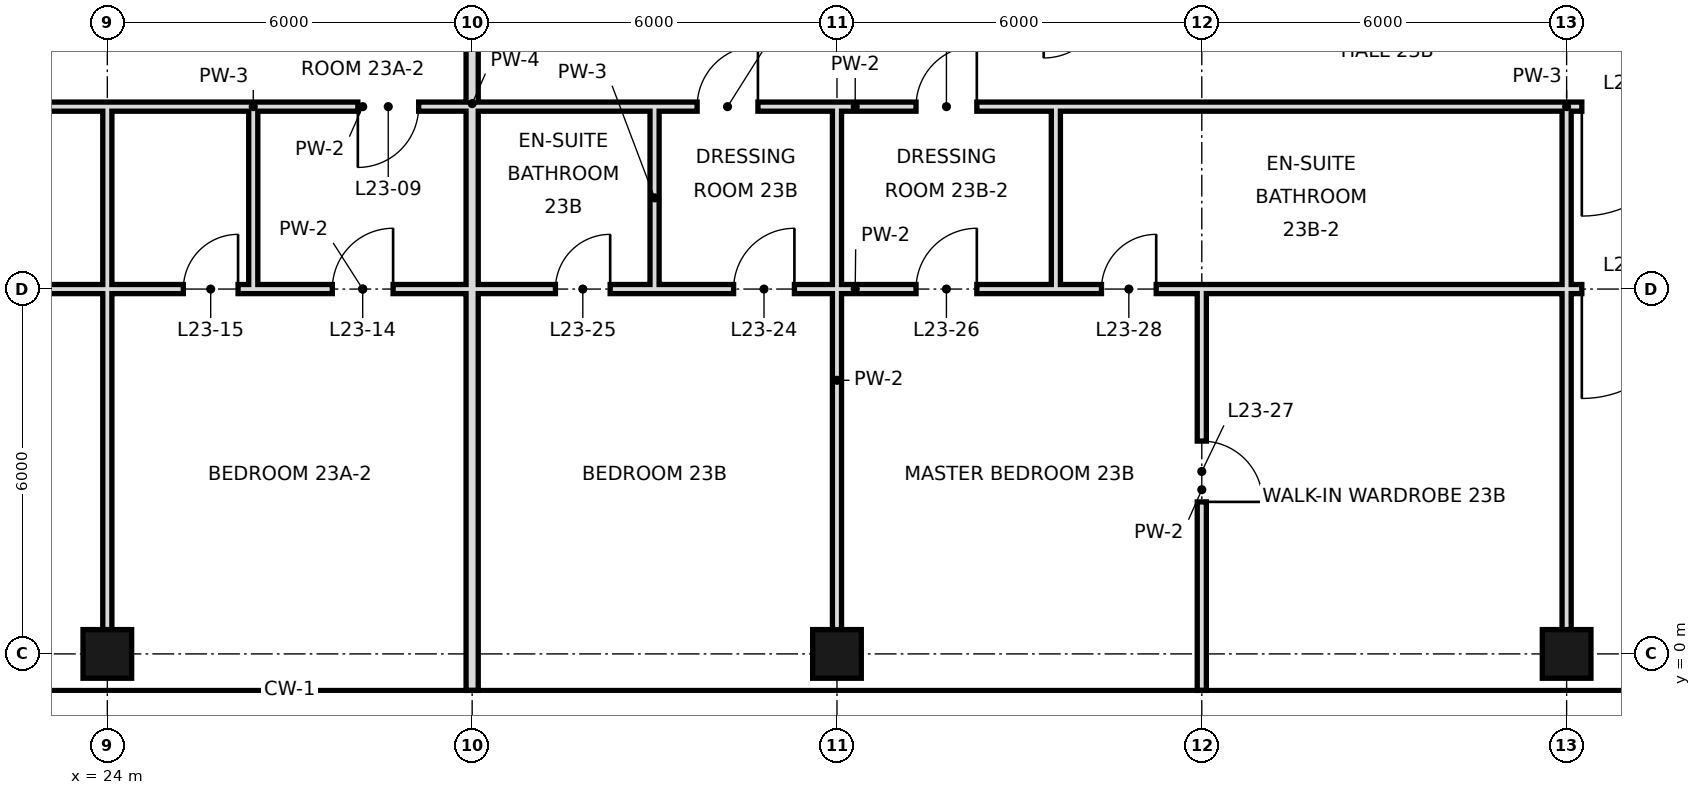
"""IFC4 building model, lengths in metres.
Left out: names, types, materials, properties, quantities, classifications, styles, units other than length and angle.
Written with IfcOpenShell. Run it as: python <this file> out.ifc"""

import sys

from ifc_helpers import new_model, si_unit, direction, frame, frame_2d, origin, origin_2d, place, context, subcontext, project, spatial, rectangle, hollow_rectangle, extrude, element, fill, save


model = new_model("IFC4")
c1 = context("Model", 3, precision=1e-05, world=origin(), true_north=direction((0.0, 1.0)))
c2 = subcontext(c1, "Body", "Model", "MODEL_VIEW")
j1 = project(units=[si_unit("LENGTHUNIT", "METRE"), si_unit("PLANEANGLEUNIT", "RADIAN")], contexts=[c1])
p1 = place(None, origin())
s1 = spatial("IfcSite", under=j1, at=p1, CompositionType="ELEMENT")
p2 = place(p1, origin())
s2 = spatial("IfcBuilding", under=s1, at=p2, CompositionType="ELEMENT")
p3 = place(p2, frame((0.0, 0.0, 107.0)))
s3 = spatial("IfcBuildingStorey", under=s2, at=p3, CompositionType="ELEMENT", Elevation=107.0)
for number, where, z_axis, x_axis in (
    (1, (24.0, 0.0, 0.0), (0.0, 0.0, 1.0), (1.0, 0.0, 0.0)),
    (2, (36.0, 0.0, 0.0), (0.0, 0.0, 1.0), (1.0, 0.0, 0.0)),
    (3, (48.0, 0.0, 0.0), (0.0, 0.0, 1.0), (1.0, 0.0, 0.0)),
):
    element("IfcColumn", number, at=place(p3, frame(where, z_axis=z_axis, x_axis=x_axis)), inside=s3, PredefinedType="COLUMN", context=c2, shape_type="SweptSolid", body=[
        extrude(hollow_rectangle(XDim=0.8, YDim=0.8, WallThickness=0.04, at=origin_2d()), origin(), (0.0, 0.0, 1.0), 3.6),
    ])
p4 = place(p3, frame((24.0, 0.0, 0.0), z_axis=(0.0, 0.0, 1.0), x_axis=(0.0, 1.0, 0.0)))
e4 = element("IfcWall", 4, at=p4, inside=s3, PredefinedType="PARTITIONING", context=c2, shape_type="SweptSolid", body=[
    extrude(rectangle(XDim=6.0, YDim=0.15, at=frame_2d((3.0, 0.0))), origin(), (0.0, 0.0, 1.0), 2.72),
])
p5 = place(p3, frame((24.0, 6.0, 0.0), z_axis=(0.0, 0.0, 1.0), x_axis=(0.0, 1.0, 0.0)))
e5 = element("IfcWall", 5, at=p5, inside=s3, PredefinedType="PARTITIONING", context=c2, shape_type="SweptSolid", body=[
    extrude(rectangle(XDim=3.0, YDim=0.15, at=frame_2d((1.5, 0.0))), origin(), (0.0, 0.0, 1.0), 2.72),
])
p6 = place(p3, frame((26.4, 6.0, 0.0), z_axis=(0.0, 0.0, 1.0), x_axis=(0.0, 1.0, 0.0)))
e6 = element("IfcWall", 6, at=p6, inside=s3, PredefinedType="PARTITIONING", context=c2, shape_type="SweptSolid", body=[
    extrude(rectangle(XDim=3.0, YDim=0.15, at=frame_2d((1.5, 0.0))), origin(), (0.0, 0.0, 1.0), 3.42),
])
p7 = place(p3, frame((30.0, -0.6, 0.0), z_axis=(0.0, 0.0, 1.0), x_axis=(0.0, 1.0, 0.0)))
e7 = element("IfcWall", 7, at=p7, inside=s3, PredefinedType="SOLIDWALL", context=c2, shape_type="SweptSolid", body=[
    extrude(rectangle(XDim=19.3, YDim=0.2, at=frame_2d((9.65, 0.0))), origin(), (0.0, 0.0, 1.0), 2.72),
])
p8 = place(p3, frame((33.0, 6.0, 0.0), z_axis=(0.0, 0.0, 1.0), x_axis=(0.0, 1.0, 0.0)))
e8 = element("IfcWall", 8, at=p8, inside=s3, PredefinedType="PARTITIONING", context=c2, shape_type="SweptSolid", body=[
    extrude(rectangle(XDim=3.0, YDim=0.15, at=frame_2d((1.5, 0.0))), origin(), (0.0, 0.0, 1.0), 3.42),
])
p9 = place(p3, frame((36.0, 0.0, 0.0), z_axis=(0.0, 0.0, 1.0), x_axis=(0.0, 1.0, 0.0)))
e9 = element("IfcWall", 9, at=p9, inside=s3, PredefinedType="PARTITIONING", context=c2, shape_type="SweptSolid", body=[
    extrude(rectangle(XDim=9.0, YDim=0.15, at=frame_2d((4.5, 0.0))), origin(), (0.0, 0.0, 1.0), 2.72),
])
p10 = place(p3, frame((39.6, 6.0, 0.0), z_axis=(0.0, 0.0, 1.0), x_axis=(0.0, 1.0, 0.0)))
e10 = element("IfcWall", 10, at=p10, inside=s3, PredefinedType="PARTITIONING", context=c2, shape_type="SweptSolid", body=[
    extrude(rectangle(XDim=3.0, YDim=0.15, at=frame_2d((1.5, 0.0))), origin(), (0.0, 0.0, 1.0), 3.42),
])
p11 = place(p3, frame((42.0, -0.6, 0.0), z_axis=(0.0, 0.0, 1.0), x_axis=(0.0, 1.0, 0.0)))
e11 = element("IfcWall", 11, at=p11, inside=s3, PredefinedType="PARTITIONING", context=c2, shape_type="SweptSolid", body=[
    extrude(rectangle(XDim=6.6, YDim=0.15, at=frame_2d((3.3, 0.0))), origin(), (0.0, 0.0, 1.0), 2.72),
])
p12 = place(p11, frame((3.1, 0.0, 0.0)))
e12 = element("IfcOpeningElement", 12, at=p12, cuts=e11, PredefinedType="OPENING", context=c2, shape_type="SweptSolid", body=[
    extrude(rectangle(XDim=1.0, YDim=2.4, at=frame_2d((0.5, 1.2))), frame((0.0, 0.085, 0.0), z_axis=(0.0, -1.0, 0.0), x_axis=(1.0, 0.0, 0.0)), (0.0, 0.0, 1.0), 0.17),
])
p13 = place(p3, frame((48.0, 0.0, 0.0), z_axis=(0.0, 0.0, 1.0), x_axis=(0.0, 1.0, 0.0)))
e13 = element("IfcWall", 13, at=p13, inside=s3, PredefinedType="PARTITIONING", context=c2, shape_type="SweptSolid", body=[
    extrude(rectangle(XDim=6.0, YDim=0.15, at=frame_2d((3.0, 0.0))), origin(), (0.0, 0.0, 1.0), 2.72),
])
p14 = place(p3, frame((48.0, 6.0, 0.0), z_axis=(0.0, 0.0, 1.0), x_axis=(0.0, 1.0, 0.0)))
e14 = element("IfcWall", 14, at=p14, inside=s3, PredefinedType="PARTITIONING", context=c2, shape_type="SweptSolid", body=[
    extrude(rectangle(XDim=3.0, YDim=0.15, at=frame_2d((1.5, 0.0))), origin(), (0.0, 0.0, 1.0), 2.72),
])
p15 = place(p3, frame((9.0, 6.0, 0.0), z_axis=(0.0, 0.0, 1.0), x_axis=(1.0, 0.0, 0.0)))
e15 = element("IfcWall", 15, at=p15, inside=s3, PredefinedType="PARTITIONING", context=c2, shape_type="SweptSolid", body=[
    extrude(rectangle(XDim=15.0, YDim=0.15, at=frame_2d((7.5, 0.0))), origin(), (0.0, 0.0, 1.0), 2.97),
])
p16 = place(p15, frame((1.3, 0.0, 0.0)))
e16 = element("IfcOpeningElement", 16, at=p16, cuts=e15, PredefinedType="OPENING", context=c2, shape_type="SweptSolid", body=[
    extrude(rectangle(XDim=1.0, YDim=2.4, at=frame_2d((0.5, 1.2))), frame((0.0, 0.085, 0.0), z_axis=(0.0, -1.0, 0.0), x_axis=(1.0, 0.0, 0.0)), (0.0, 0.0, 1.0), 0.17),
])
p17 = place(p15, frame((3.25, 0.0, 0.0)))
e17 = element("IfcOpeningElement", 17, at=p17, cuts=e15, PredefinedType="OPENING", context=c2, shape_type="SweptSolid", body=[
    extrude(rectangle(XDim=1.0, YDim=2.4, at=frame_2d((0.5, 1.2))), frame((0.0, 0.085, 0.0), z_axis=(0.0, -1.0, 0.0), x_axis=(1.0, 0.0, 0.0)), (0.0, 0.0, 1.0), 0.17),
])
p18 = place(p3, frame((26.4, 6.0, 0.0), z_axis=(0.0, 0.0, 1.0), x_axis=(1.0, 0.0, 0.0)))
e18 = element("IfcWall", 18, at=p18, inside=s3, PredefinedType="PARTITIONING", context=c2, shape_type="SweptSolid", body=[
    extrude(rectangle(XDim=3.6, YDim=0.15, at=frame_2d((1.8, 0.0))), origin(), (0.0, 0.0, 1.0), 2.97),
])
p19 = place(p18, frame((1.3, 0.0, 0.0)))
e19 = element("IfcOpeningElement", 19, at=p19, cuts=e18, PredefinedType="OPENING", context=c2, shape_type="SweptSolid", body=[
    extrude(rectangle(XDim=1.0, YDim=2.4, at=frame_2d((0.5, 1.2))), frame((0.0, 0.085, 0.0), z_axis=(0.0, -1.0, 0.0), x_axis=(1.0, 0.0, 0.0)), (0.0, 0.0, 1.0), 0.17),
])
p20 = place(p3, frame((33.0, 6.0, 0.0), z_axis=(0.0, 0.0, 1.0), x_axis=(1.0, 0.0, 0.0)))
e20 = element("IfcWall", 20, at=p20, inside=s3, PredefinedType="PARTITIONING", context=c2, shape_type="SweptSolid", body=[
    extrude(rectangle(XDim=6.6, YDim=0.15, at=frame_2d((3.3, 0.0))), origin(), (0.0, 0.0, 1.0), 2.97),
])
p21 = place(p20, frame((1.3, 0.0, 0.0)))
e21 = element("IfcOpeningElement", 21, at=p21, cuts=e20, PredefinedType="OPENING", context=c2, shape_type="SweptSolid", body=[
    extrude(rectangle(XDim=1.0, YDim=2.4, at=frame_2d((0.5, 1.2))), frame((0.0, 0.085, 0.0), z_axis=(0.0, -1.0, 0.0), x_axis=(1.0, 0.0, 0.0)), (0.0, 0.0, 1.0), 0.17),
])
p22 = place(p20, frame((4.3, 0.0, 0.0)))
e22 = element("IfcOpeningElement", 22, at=p22, cuts=e20, PredefinedType="OPENING", context=c2, shape_type="SweptSolid", body=[
    extrude(rectangle(XDim=1.0, YDim=2.4, at=frame_2d((0.5, 1.2))), frame((0.0, 0.085, 0.0), z_axis=(0.0, -1.0, 0.0), x_axis=(1.0, 0.0, 0.0)), (0.0, 0.0, 1.0), 0.17),
])
p23 = place(p3, frame((48.0, 6.0, 0.0), z_axis=(0.0, 0.0, 1.0), x_axis=(1.0, 0.0, 0.0)))
e23 = element("IfcWall", 23, at=p23, inside=s3, PredefinedType="PARTITIONING", context=c2, shape_type="SweptSolid", body=[
    extrude(rectangle(XDim=12.0, YDim=0.15, at=frame_2d((6.0, 0.0))), origin(), (0.0, 0.0, 1.0), 2.72),
])
p24 = place(p23, frame((0.25, 0.0, 0.0)))
e24 = element("IfcOpeningElement", 24, at=p24, cuts=e23, PredefinedType="OPENING", context=c2, shape_type="SweptSolid", body=[
    extrude(rectangle(XDim=1.8, YDim=2.4, at=frame_2d((0.9, 1.2))), frame((0.0, 0.085, 0.0), z_axis=(0.0, -1.0, 0.0), x_axis=(1.0, 0.0, 0.0)), (0.0, 0.0, 1.0), 0.17),
])
p25 = place(p3, frame((24.0, 6.0, 0.0), z_axis=(0.0, 0.0, 1.0), x_axis=(1.0, 0.0, 0.0)))
e25 = element("IfcWall", 25, at=p25, inside=s3, PredefinedType="PARTITIONING", context=c2, shape_type="SweptSolid", body=[
    extrude(rectangle(XDim=2.4, YDim=0.15, at=frame_2d((1.2, 0.0))), origin(), (0.0, 0.0, 1.0), 2.97),
])
p26 = place(p25, frame((1.25, 0.0, 0.0)))
e26 = element("IfcOpeningElement", 26, at=p26, cuts=e25, PredefinedType="OPENING", context=c2, shape_type="SweptSolid", body=[
    extrude(rectangle(XDim=0.9, YDim=2.4, at=frame_2d((0.45, 1.2))), frame((0.0, 0.085, 0.0), z_axis=(0.0, -1.0, 0.0), x_axis=(1.0, 0.0, 0.0)), (0.0, 0.0, 1.0), 0.17),
])
p27 = place(p3, frame((30.0, 6.0, 0.0), z_axis=(0.0, 0.0, 1.0), x_axis=(1.0, 0.0, 0.0)))
e27 = element("IfcWall", 27, at=p27, inside=s3, PredefinedType="PARTITIONING", context=c2, shape_type="SweptSolid", body=[
    extrude(rectangle(XDim=3.0, YDim=0.15, at=frame_2d((1.5, 0.0))), origin(), (0.0, 0.0, 1.0), 2.97),
])
p28 = place(p27, frame((1.37, 0.0, 0.0)))
e28 = element("IfcOpeningElement", 28, at=p28, cuts=e27, PredefinedType="OPENING", context=c2, shape_type="SweptSolid", body=[
    extrude(rectangle(XDim=0.9, YDim=2.4, at=frame_2d((0.45, 1.2))), frame((0.0, 0.085, 0.0), z_axis=(0.0, -1.0, 0.0), x_axis=(1.0, 0.0, 0.0)), (0.0, 0.0, 1.0), 0.17),
])
p29 = place(p3, frame((39.6, 6.0, 0.0), z_axis=(0.0, 0.0, 1.0), x_axis=(1.0, 0.0, 0.0)))
e29 = element("IfcWall", 29, at=p29, inside=s3, PredefinedType="PARTITIONING", context=c2, shape_type="SweptSolid", body=[
    extrude(rectangle(XDim=8.4, YDim=0.15, at=frame_2d((4.2, 0.0))), origin(), (0.0, 0.0, 1.0), 2.97),
])
p30 = place(p29, frame((0.75, 0.0, 0.0)))
e30 = element("IfcOpeningElement", 30, at=p30, cuts=e29, PredefinedType="OPENING", context=c2, shape_type="SweptSolid", body=[
    extrude(rectangle(XDim=0.9, YDim=2.4, at=frame_2d((0.45, 1.2))), frame((0.0, 0.085, 0.0), z_axis=(0.0, -1.0, 0.0), x_axis=(1.0, 0.0, 0.0)), (0.0, 0.0, 1.0), 0.17),
])
p31 = place(p3, frame((9.0, 9.0, 0.0), z_axis=(0.0, 0.0, 1.0), x_axis=(1.0, 0.0, 0.0)))
e31 = element("IfcWall", 31, at=p31, inside=s3, PredefinedType="PARTITIONING", context=c2, shape_type="SweptSolid", body=[
    extrude(rectangle(XDim=15.0, YDim=0.15, at=frame_2d((7.5, 0.0))), origin(), (0.0, 0.0, 1.0), 3.42),
])
p32 = place(p31, frame((1.0, 0.0, 0.0)))
e32 = element("IfcOpeningElement", 32, at=p32, cuts=e31, PredefinedType="OPENING", context=c2, shape_type="SweptSolid", body=[
    extrude(rectangle(XDim=1.0, YDim=2.4, at=frame_2d((0.5, 1.2))), frame((0.0, 0.085, 0.0), z_axis=(0.0, -1.0, 0.0), x_axis=(1.0, 0.0, 0.0)), (0.0, 0.0, 1.0), 0.17),
])
p33 = place(p31, frame((10.6, 0.0, 0.0)))
e33 = element("IfcOpeningElement", 33, at=p33, cuts=e31, PredefinedType="OPENING", context=c2, shape_type="SweptSolid", body=[
    extrude(rectangle(XDim=1.0, YDim=2.4, at=frame_2d((0.5, 1.2))), frame((0.0, 0.085, 0.0), z_axis=(0.0, -1.0, 0.0), x_axis=(1.0, 0.0, 0.0)), (0.0, 0.0, 1.0), 0.17),
])
p34 = place(p3, frame((26.4, 9.0, 0.0), z_axis=(0.0, 0.0, 1.0), x_axis=(1.0, 0.0, 0.0)))
e34 = element("IfcWall", 34, at=p34, inside=s3, PredefinedType="PARTITIONING", context=c2, shape_type="SweptSolid", body=[
    extrude(rectangle(XDim=3.6, YDim=0.15, at=frame_2d((1.8, 0.0))), origin(), (0.0, 0.0, 1.0), 3.42),
])
p35 = place(p34, frame((1.72, 0.0, 0.0)))
e35 = element("IfcOpeningElement", 35, at=p35, cuts=e34, PredefinedType="OPENING", context=c2, shape_type="SweptSolid", body=[
    extrude(rectangle(XDim=1.0, YDim=2.4, at=frame_2d((0.5, 1.2))), frame((0.0, 0.085, 0.0), z_axis=(0.0, -1.0, 0.0), x_axis=(1.0, 0.0, 0.0)), (0.0, 0.0, 1.0), 0.17),
])
p36 = place(p3, frame((33.0, 9.0, 0.0), z_axis=(0.0, 0.0, 1.0), x_axis=(1.0, 0.0, 0.0)))
e36 = element("IfcWall", 36, at=p36, inside=s3, PredefinedType="PARTITIONING", context=c2, shape_type="SweptSolid", body=[
    extrude(rectangle(XDim=6.6, YDim=0.15, at=frame_2d((3.3, 0.0))), origin(), (0.0, 0.0, 1.0), 3.42),
])
p37 = place(p36, frame((0.7, 0.0, 0.0)))
e37 = element("IfcOpeningElement", 37, at=p37, cuts=e36, PredefinedType="OPENING", context=c2, shape_type="SweptSolid", body=[
    extrude(rectangle(XDim=1.0, YDim=2.4, at=frame_2d((0.5, 1.2))), frame((0.0, 0.085, 0.0), z_axis=(0.0, -1.0, 0.0), x_axis=(1.0, 0.0, 0.0)), (0.0, 0.0, 1.0), 0.17),
])
p38 = place(p36, frame((4.3, 0.0, 0.0)))
e38 = element("IfcOpeningElement", 38, at=p38, cuts=e36, PredefinedType="OPENING", context=c2, shape_type="SweptSolid", body=[
    extrude(rectangle(XDim=1.0, YDim=2.4, at=frame_2d((0.5, 1.2))), frame((0.0, 0.085, 0.0), z_axis=(0.0, -1.0, 0.0), x_axis=(1.0, 0.0, 0.0)), (0.0, 0.0, 1.0), 0.17),
])
p39 = place(p3, frame((48.0, 9.0, 0.0), z_axis=(0.0, 0.0, 1.0), x_axis=(1.0, 0.0, 0.0)))
e39 = element("IfcWall", 39, at=p39, inside=s3, PredefinedType="PARTITIONING", context=c2, shape_type="SweptSolid", body=[
    extrude(rectangle(XDim=12.6, YDim=0.15, at=frame_2d((6.3, 0.0))), origin(), (0.0, 0.0, 1.0), 3.42),
])
p40 = place(p39, frame((0.25, 0.0, 0.0)))
e40 = element("IfcOpeningElement", 40, at=p40, cuts=e39, PredefinedType="OPENING", context=c2, shape_type="SweptSolid", body=[
    extrude(rectangle(XDim=1.8, YDim=2.4, at=frame_2d((0.9, 1.2))), frame((0.0, 0.085, 0.0), z_axis=(0.0, -1.0, 0.0), x_axis=(1.0, 0.0, 0.0)), (0.0, 0.0, 1.0), 0.17),
])
p41 = place(p3, frame((24.0, 9.0, 0.0), z_axis=(0.0, 0.0, 1.0), x_axis=(1.0, 0.0, 0.0)))
e41 = element("IfcWall", 41, at=p41, inside=s3, PredefinedType="PARTITIONING", context=c2, shape_type="SweptSolid", body=[
    extrude(rectangle(XDim=2.4, YDim=0.15, at=frame_2d((1.2, 0.0))), origin(), (0.0, 0.0, 1.0), 3.42),
])
p42 = place(p3, frame((30.0, 9.0, 0.0), z_axis=(0.0, 0.0, 1.0), x_axis=(1.0, 0.0, 0.0)))
e42 = element("IfcWall", 42, at=p42, inside=s3, PredefinedType="PARTITIONING", context=c2, shape_type="SweptSolid", body=[
    extrude(rectangle(XDim=3.0, YDim=0.15, at=frame_2d((1.5, 0.0))), origin(), (0.0, 0.0, 1.0), 3.42),
])
p43 = place(p3, frame((39.6, 9.0, 0.0), z_axis=(0.0, 0.0, 1.0), x_axis=(1.0, 0.0, 0.0)))
e43 = element("IfcWall", 43, at=p43, inside=s3, PredefinedType="PARTITIONING", context=c2, shape_type="SweptSolid", body=[
    extrude(rectangle(XDim=8.4, YDim=0.15, at=frame_2d((4.2, 0.0))), origin(), (0.0, 0.0, 1.0), 3.42),
])
p44 = place(p35, frame((1.0, 0.0, 0.0), z_axis=(0.0, 0.0, 1.0), x_axis=(-1.0, 0.0, 0.0)))
e44 = element("IfcDoor", 44, at=p44, inside=s3, OperationType="SINGLE_SWING_RIGHT", PredefinedType="DOOR", context=c2, shape_type="SweptSolid", body=[
    extrude(rectangle(XDim=1.0, YDim=2.4, at=frame_2d((0.5, 1.2))), frame((0.0, 0.025, 0.0), z_axis=(0.0, -1.0, 0.0), x_axis=(1.0, 0.0, 0.0)), (0.0, 0.0, 1.0), 0.05),
])
fill(e35, e44)
p45 = place(p19, frame((1.0, 0.0, 0.0), z_axis=(0.0, 0.0, 1.0), x_axis=(-1.0, 0.0, 0.0)))
e45 = element("IfcDoor", 45, at=p45, inside=s3, OperationType="SINGLE_SWING_LEFT", PredefinedType="DOOR", context=c2, shape_type="SweptSolid", body=[
    extrude(rectangle(XDim=1.0, YDim=2.4, at=frame_2d((0.5, 1.2))), frame((0.0, 0.025, 0.0), z_axis=(0.0, -1.0, 0.0), x_axis=(1.0, 0.0, 0.0)), (0.0, 0.0, 1.0), 0.05),
])
fill(e19, e45)
p46 = place(p26, frame((0.9, 0.0, 0.0), z_axis=(0.0, 0.0, 1.0), x_axis=(-1.0, 0.0, 0.0)))
e46 = element("IfcDoor", 46, at=p46, inside=s3, OperationType="SINGLE_SWING_LEFT", PredefinedType="DOOR", context=c2, shape_type="SweptSolid", body=[
    extrude(rectangle(XDim=0.9, YDim=2.4, at=frame_2d((0.45, 1.2))), frame((0.0, 0.025, 0.0), z_axis=(0.0, -1.0, 0.0), x_axis=(1.0, 0.0, 0.0)), (0.0, 0.0, 1.0), 0.05),
])
fill(e26, e46)
p47 = place(p37, frame((1.0, 0.0, 0.0), z_axis=(0.0, 0.0, 1.0), x_axis=(-1.0, 0.0, 0.0)))
e47 = element("IfcDoor", 47, at=p47, inside=s3, OperationType="SINGLE_SWING_LEFT", PredefinedType="DOOR", context=c2, shape_type="SweptSolid", body=[
    extrude(rectangle(XDim=1.0, YDim=2.4, at=frame_2d((0.5, 1.2))), frame((0.0, 0.025, 0.0), z_axis=(0.0, -1.0, 0.0), x_axis=(1.0, 0.0, 0.0)), (0.0, 0.0, 1.0), 0.05),
])
fill(e37, e47)
p48 = place(p38, frame((1.0, 0.0, 0.0), z_axis=(0.0, 0.0, 1.0), x_axis=(-1.0, 0.0, 0.0)))
e48 = element("IfcDoor", 48, at=p48, inside=s3, OperationType="SINGLE_SWING_LEFT", PredefinedType="DOOR", context=c2, shape_type="SweptSolid", body=[
    extrude(rectangle(XDim=1.0, YDim=2.4, at=frame_2d((0.5, 1.2))), frame((0.0, 0.025, 0.0), z_axis=(0.0, -1.0, 0.0), x_axis=(1.0, 0.0, 0.0)), (0.0, 0.0, 1.0), 0.05),
])
fill(e38, e48)
p49 = place(p40, frame((1.8, 0.0, 0.0), z_axis=(0.0, 0.0, 1.0), x_axis=(-1.0, 0.0, 0.0)))
e49 = element("IfcDoor", 49, at=p49, inside=s3, OperationType="SINGLE_SWING_RIGHT", PredefinedType="DOOR", context=c2, shape_type="SweptSolid", body=[
    extrude(rectangle(XDim=1.8, YDim=2.4, at=frame_2d((0.9, 1.2))), frame((0.0, 0.025, 0.0), z_axis=(0.0, -1.0, 0.0), x_axis=(1.0, 0.0, 0.0)), (0.0, 0.0, 1.0), 0.05),
])
fill(e40, e49)
p50 = place(p21, frame((1.0, 0.0, 0.0), z_axis=(0.0, 0.0, 1.0), x_axis=(-1.0, 0.0, 0.0)))
e50 = element("IfcDoor", 50, at=p50, inside=s3, OperationType="SINGLE_SWING_LEFT", PredefinedType="DOOR", context=c2, shape_type="SweptSolid", body=[
    extrude(rectangle(XDim=1.0, YDim=2.4, at=frame_2d((0.5, 1.2))), frame((0.0, 0.025, 0.0), z_axis=(0.0, -1.0, 0.0), x_axis=(1.0, 0.0, 0.0)), (0.0, 0.0, 1.0), 0.05),
])
fill(e21, e50)
p51 = place(p28, frame((0.9, 0.0, 0.0), z_axis=(0.0, 0.0, 1.0), x_axis=(-1.0, 0.0, 0.0)))
e51 = element("IfcDoor", 51, at=p51, inside=s3, OperationType="SINGLE_SWING_LEFT", PredefinedType="DOOR", context=c2, shape_type="SweptSolid", body=[
    extrude(rectangle(XDim=0.9, YDim=2.4, at=frame_2d((0.45, 1.2))), frame((0.0, 0.025, 0.0), z_axis=(0.0, -1.0, 0.0), x_axis=(1.0, 0.0, 0.0)), (0.0, 0.0, 1.0), 0.05),
])
fill(e28, e51)
p52 = place(p22, frame((1.0, 0.0, 0.0), z_axis=(0.0, 0.0, 1.0), x_axis=(-1.0, 0.0, 0.0)))
e52 = element("IfcDoor", 52, at=p52, inside=s3, OperationType="SINGLE_SWING_LEFT", PredefinedType="DOOR", context=c2, shape_type="SweptSolid", body=[
    extrude(rectangle(XDim=1.0, YDim=2.4, at=frame_2d((0.5, 1.2))), frame((0.0, 0.025, 0.0), z_axis=(0.0, -1.0, 0.0), x_axis=(1.0, 0.0, 0.0)), (0.0, 0.0, 1.0), 0.05),
])
fill(e22, e52)
p53 = place(p12, frame((1.0, 0.0, 0.0), z_axis=(0.0, 0.0, 1.0), x_axis=(-1.0, 0.0, 0.0)))
e53 = element("IfcDoor", 53, at=p53, inside=s3, OperationType="SINGLE_SWING_RIGHT", PredefinedType="DOOR", context=c2, shape_type="SweptSolid", body=[
    extrude(rectangle(XDim=1.0, YDim=2.4, at=frame_2d((0.5, 1.2))), frame((0.0, 0.025, 0.0), z_axis=(0.0, -1.0, 0.0), x_axis=(1.0, 0.0, 0.0)), (0.0, 0.0, 1.0), 0.05),
])
fill(e12, e53)
p54 = place(p30, frame((0.9, 0.0, 0.0), z_axis=(0.0, 0.0, 1.0), x_axis=(-1.0, 0.0, 0.0)))
e54 = element("IfcDoor", 54, at=p54, inside=s3, OperationType="SINGLE_SWING_LEFT", PredefinedType="DOOR", context=c2, shape_type="SweptSolid", body=[
    extrude(rectangle(XDim=0.9, YDim=2.4, at=frame_2d((0.45, 1.2))), frame((0.0, 0.025, 0.0), z_axis=(0.0, -1.0, 0.0), x_axis=(1.0, 0.0, 0.0)), (0.0, 0.0, 1.0), 0.05),
])
fill(e30, e54)
p55 = place(p24, frame((1.8, 0.0, 0.0), z_axis=(0.0, 0.0, 1.0), x_axis=(-1.0, 0.0, 0.0)))
e55 = element("IfcDoor", 55, at=p55, inside=s3, OperationType="SINGLE_SWING_RIGHT", PredefinedType="DOOR", context=c2, shape_type="SweptSolid", body=[
    extrude(rectangle(XDim=1.8, YDim=2.4, at=frame_2d((0.9, 1.2))), frame((0.0, 0.025, 0.0), z_axis=(0.0, -1.0, 0.0), x_axis=(1.0, 0.0, 0.0)), (0.0, 0.0, 1.0), 0.05),
])
fill(e24, e55)
save(model, sys.argv[1])
